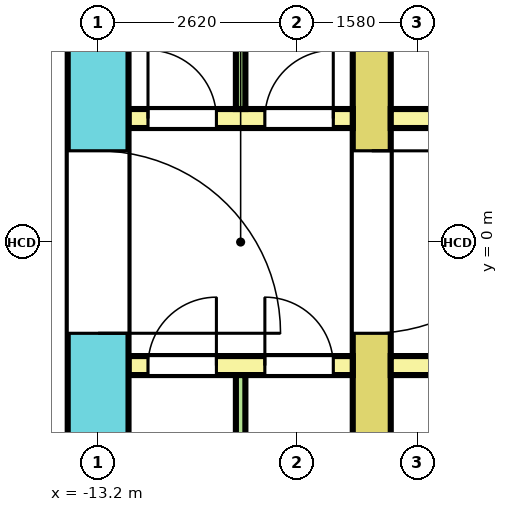
"""IFC4 building model, lengths in metres.
Left out: names, types, materials, properties, quantities, classifications, styles, units other than length and angle.
Written with IfcOpenShell. Run it as: python <this file> out.ifc"""

import sys

from ifc_helpers import new_model, si_unit, direction, frame, frame_2d, origin, place, context, subcontext, project, spatial, rectangle, extrude, element, fill, save


model = new_model("IFC4")
c1 = context("Model", 3, precision=1e-05, world=origin(), true_north=direction((0.0, 1.0)))
c2 = subcontext(c1, "Body", "Model", "MODEL_VIEW")
j1 = project(units=[si_unit("LENGTHUNIT", "METRE"), si_unit("PLANEANGLEUNIT", "RADIAN")], contexts=[c1])
p1 = place(None, origin())
s1 = spatial("IfcSite", under=j1, at=p1, CompositionType="ELEMENT")
p2 = place(p1, origin())
s2 = spatial("IfcBuilding", under=s1, at=p2, CompositionType="ELEMENT")
p3 = place(p2, frame((0.0, 0.0, 117.6)))
s3 = spatial("IfcBuildingStorey", under=s2, at=p3, CompositionType="ELEMENT", Elevation=117.6)
p4 = place(p3, frame((-13.2, -10.4, 0.0), z_axis=(0.0, 0.0, 1.0), x_axis=(0.0, 1.0, 0.0)))
e1 = element("IfcWall", 1, at=p4, inside=s3, PredefinedType="SHEAR", context=c2, shape_type="SweptSolid", body=[
    extrude(rectangle(XDim=20.8, YDim=0.8, at=frame_2d((10.4, 0.0))), origin(), (0.0, 0.0, 1.0), 4.1),
])
p5 = place(p4, frame((9.2, 0.0, 0.0)))
e2 = element("IfcOpeningElement", 2, at=p5, cuts=e1, PredefinedType="OPENING", context=c2, shape_type="SweptSolid", body=[
    extrude(rectangle(XDim=2.4, YDim=2.1, at=frame_2d((1.2, 1.05))), frame((0.0, 0.41, 0.0), z_axis=(0.0, -1.0, 0.0), x_axis=(1.0, 0.0, 0.0)), (0.0, 0.0, 1.0), 0.82),
])
p6 = place(p4, frame((16.1, 0.0, 0.0)))
e3 = element("IfcOpeningElement", 3, at=p6, cuts=e1, PredefinedType="OPENING", context=c2, shape_type="SweptSolid", body=[
    extrude(rectangle(XDim=1.2, YDim=2.1, at=frame_2d((0.6, 1.05))), frame((0.0, 0.41, 0.0), z_axis=(0.0, -1.0, 0.0), x_axis=(1.0, 0.0, 0.0)), (0.0, 0.0, 1.0), 0.82),
])
p7 = place(p4, frame((3.5, 0.0, 0.0)))
e4 = element("IfcOpeningElement", 4, at=p7, cuts=e1, PredefinedType="OPENING", context=c2, shape_type="SweptSolid", body=[
    extrude(rectangle(XDim=1.2, YDim=2.1, at=frame_2d((0.6, 1.05))), frame((0.0, 0.41, 0.0), z_axis=(0.0, -1.0, 0.0), x_axis=(1.0, 0.0, 0.0)), (0.0, 0.0, 1.0), 0.82),
])
p8 = place(p3, frame((-9.6, -7.7, 0.0), z_axis=(0.0, 0.0, 1.0), x_axis=(0.0, 1.0, 0.0)))
e5 = element("IfcWall", 5, at=p8, inside=s3, PredefinedType="SHEAR", context=c2, shape_type="SweptSolid", body=[
    extrude(rectangle(XDim=15.4, YDim=0.5, at=frame_2d((7.7, 0.0))), origin(), (0.0, 0.0, 1.0), 4.1),
])
p9 = place(p8, frame((6.5, 0.0, 0.0)))
e6 = element("IfcOpeningElement", 6, at=p9, cuts=e5, PredefinedType="OPENING", context=c2, shape_type="SweptSolid", body=[
    extrude(rectangle(XDim=2.4, YDim=2.1, at=frame_2d((1.2, 1.05))), frame((0.0, 0.26, 0.0), z_axis=(0.0, -1.0, 0.0), x_axis=(1.0, 0.0, 0.0)), (0.0, 0.0, 1.0), 0.52),
])
p10 = place(p8, frame((13.4, 0.0, 0.0)))
e7 = element("IfcOpeningElement", 7, at=p10, cuts=e5, PredefinedType="OPENING", context=c2, shape_type="SweptSolid", body=[
    extrude(rectangle(XDim=1.2, YDim=2.1, at=frame_2d((0.6, 1.05))), frame((0.0, 0.26, 0.0), z_axis=(0.0, -1.0, 0.0), x_axis=(1.0, 0.0, 0.0)), (0.0, 0.0, 1.0), 0.52),
])
p11 = place(p8, frame((0.8, 0.0, 0.0)))
e8 = element("IfcOpeningElement", 8, at=p11, cuts=e5, PredefinedType="OPENING", context=c2, shape_type="SweptSolid", body=[
    extrude(rectangle(XDim=1.2, YDim=2.1, at=frame_2d((0.6, 1.05))), frame((0.0, 0.26, 0.0), z_axis=(0.0, -1.0, 0.0), x_axis=(1.0, 0.0, 0.0)), (0.0, 0.0, 1.0), 0.52),
])
p12 = place(p3, frame((-12.8, 1.625, 0.0), z_axis=(0.0, 0.0, 1.0), x_axis=(1.0, 0.0, 0.0)))
e9 = element("IfcWall", 9, at=p12, inside=s3, PredefinedType="SOLIDWALL", context=c2, shape_type="SweptSolid", body=[
    extrude(rectangle(XDim=2.95, YDim=0.25, at=frame_2d((1.475, 0.0))), origin(), (0.0, 0.0, 1.0), 4.1),
])
p13 = place(p12, frame((0.256, 0.0, 0.0)))
e10 = element("IfcOpeningElement", 10, at=p13, cuts=e9, PredefinedType="OPENING", context=c2, shape_type="SweptSolid", body=[
    extrude(rectangle(XDim=0.9, YDim=2.1, at=frame_2d((0.45, 1.05))), frame((0.0, 0.135, 0.0), z_axis=(0.0, -1.0, 0.0), x_axis=(1.0, 0.0, 0.0)), (0.0, 0.0, 1.0), 0.27),
])
p14 = place(p12, frame((1.794, 0.0, 0.0)))
e11 = element("IfcOpeningElement", 11, at=p14, cuts=e9, PredefinedType="OPENING", context=c2, shape_type="SweptSolid", body=[
    extrude(rectangle(XDim=0.9, YDim=2.1, at=frame_2d((0.45, 1.05))), frame((0.0, 0.135, 0.0), z_axis=(0.0, -1.0, 0.0), x_axis=(1.0, 0.0, 0.0)), (0.0, 0.0, 1.0), 0.27),
])
p15 = place(p3, frame((-9.35, 1.625, 0.0), z_axis=(0.0, 0.0, 1.0), x_axis=(1.0, 0.0, 0.0)))
e12 = element("IfcWall", 12, at=p15, inside=s3, PredefinedType="SOLIDWALL", context=c2, shape_type="SweptSolid", body=[
    extrude(rectangle(XDim=18.7, YDim=0.25, at=frame_2d((9.35, 0.0))), origin(), (0.0, 0.0, 1.0), 4.1),
])
p16 = place(p15, frame((2.85, 0.0, 0.0)))
e13 = element("IfcOpeningElement", 13, at=p16, cuts=e12, PredefinedType="OPENING", context=c2, shape_type="SweptSolid", body=[
    extrude(rectangle(XDim=1.1, YDim=2.1, at=frame_2d((0.55, 1.05))), frame((0.0, 0.135, 0.0), z_axis=(0.0, -1.0, 0.0), x_axis=(1.0, 0.0, 0.0)), (0.0, 0.0, 1.0), 0.27),
])
p17 = place(p15, frame((5.15, 0.0, 0.0)))
e14 = element("IfcOpeningElement", 14, at=p17, cuts=e12, PredefinedType="OPENING", context=c2, shape_type="SweptSolid", body=[
    extrude(rectangle(XDim=1.1, YDim=2.1, at=frame_2d((0.55, 1.05))), frame((0.0, 0.135, 0.0), z_axis=(0.0, -1.0, 0.0), x_axis=(1.0, 0.0, 0.0)), (0.0, 0.0, 1.0), 0.27),
])
p18 = place(p15, frame((14.8, 0.0, 0.0)))
e15 = element("IfcOpeningElement", 15, at=p18, cuts=e12, PredefinedType="OPENING", context=c2, shape_type="SweptSolid", body=[
    extrude(rectangle(XDim=1.1, YDim=2.1, at=frame_2d((0.55, 1.05))), frame((0.0, 0.135, 0.0), z_axis=(0.0, -1.0, 0.0), x_axis=(1.0, 0.0, 0.0)), (0.0, 0.0, 1.0), 0.27),
])
p19 = place(p15, frame((0.575, 0.0, 0.0)))
e16 = element("IfcOpeningElement", 16, at=p19, cuts=e12, PredefinedType="OPENING", context=c2, shape_type="SweptSolid", body=[
    extrude(rectangle(XDim=0.9, YDim=2.1, at=frame_2d((0.45, 1.05))), frame((0.0, 0.135, 0.0), z_axis=(0.0, -1.0, 0.0), x_axis=(1.0, 0.0, 0.0)), (0.0, 0.0, 1.0), 0.27),
])
p20 = place(p15, frame((17.225, 0.0, 0.0)))
e17 = element("IfcOpeningElement", 17, at=p20, cuts=e12, PredefinedType="OPENING", context=c2, shape_type="SweptSolid", body=[
    extrude(rectangle(XDim=0.9, YDim=2.1, at=frame_2d((0.45, 1.05))), frame((0.0, 0.135, 0.0), z_axis=(0.0, -1.0, 0.0), x_axis=(1.0, 0.0, 0.0)), (0.0, 0.0, 1.0), 0.27),
])
p21 = place(p3, frame((-12.8, -1.625, 0.0), z_axis=(0.0, 0.0, 1.0), x_axis=(1.0, 0.0, 0.0)))
e18 = element("IfcWall", 18, at=p21, inside=s3, PredefinedType="SOLIDWALL", context=c2, shape_type="SweptSolid", body=[
    extrude(rectangle(XDim=2.95, YDim=0.25, at=frame_2d((1.475, 0.0))), origin(), (0.0, 0.0, 1.0), 4.1),
])
p22 = place(p21, frame((0.256, 0.0, 0.0)))
e19 = element("IfcOpeningElement", 19, at=p22, cuts=e18, PredefinedType="OPENING", context=c2, shape_type="SweptSolid", body=[
    extrude(rectangle(XDim=0.9, YDim=2.1, at=frame_2d((0.45, 1.05))), frame((0.0, 0.135, 0.0), z_axis=(0.0, -1.0, 0.0), x_axis=(1.0, 0.0, 0.0)), (0.0, 0.0, 1.0), 0.27),
])
p23 = place(p21, frame((1.794, 0.0, 0.0)))
e20 = element("IfcOpeningElement", 20, at=p23, cuts=e18, PredefinedType="OPENING", context=c2, shape_type="SweptSolid", body=[
    extrude(rectangle(XDim=0.9, YDim=2.1, at=frame_2d((0.45, 1.05))), frame((0.0, 0.135, 0.0), z_axis=(0.0, -1.0, 0.0), x_axis=(1.0, 0.0, 0.0)), (0.0, 0.0, 1.0), 0.27),
])
p24 = place(p3, frame((-9.35, -1.625, 0.0), z_axis=(0.0, 0.0, 1.0), x_axis=(1.0, 0.0, 0.0)))
e21 = element("IfcWall", 21, at=p24, inside=s3, PredefinedType="SOLIDWALL", context=c2, shape_type="SweptSolid", body=[
    extrude(rectangle(XDim=18.7, YDim=0.25, at=frame_2d((9.35, 0.0))), origin(), (0.0, 0.0, 1.0), 4.1),
])
p25 = place(p24, frame((2.85, 0.0, 0.0)))
e22 = element("IfcOpeningElement", 22, at=p25, cuts=e21, PredefinedType="OPENING", context=c2, shape_type="SweptSolid", body=[
    extrude(rectangle(XDim=1.1, YDim=2.1, at=frame_2d((0.55, 1.05))), frame((0.0, 0.135, 0.0), z_axis=(0.0, -1.0, 0.0), x_axis=(1.0, 0.0, 0.0)), (0.0, 0.0, 1.0), 0.27),
])
p26 = place(p24, frame((5.15, 0.0, 0.0)))
e23 = element("IfcOpeningElement", 23, at=p26, cuts=e21, PredefinedType="OPENING", context=c2, shape_type="SweptSolid", body=[
    extrude(rectangle(XDim=1.1, YDim=2.1, at=frame_2d((0.55, 1.05))), frame((0.0, 0.135, 0.0), z_axis=(0.0, -1.0, 0.0), x_axis=(1.0, 0.0, 0.0)), (0.0, 0.0, 1.0), 0.27),
])
p27 = place(p24, frame((14.8, 0.0, 0.0)))
e24 = element("IfcOpeningElement", 24, at=p27, cuts=e21, PredefinedType="OPENING", context=c2, shape_type="SweptSolid", body=[
    extrude(rectangle(XDim=1.1, YDim=2.1, at=frame_2d((0.55, 1.05))), frame((0.0, 0.135, 0.0), z_axis=(0.0, -1.0, 0.0), x_axis=(1.0, 0.0, 0.0)), (0.0, 0.0, 1.0), 0.27),
])
p28 = place(p24, frame((0.575, 0.0, 0.0)))
e25 = element("IfcOpeningElement", 25, at=p28, cuts=e21, PredefinedType="OPENING", context=c2, shape_type="SweptSolid", body=[
    extrude(rectangle(XDim=0.9, YDim=2.1, at=frame_2d((0.45, 1.05))), frame((0.0, 0.135, 0.0), z_axis=(0.0, -1.0, 0.0), x_axis=(1.0, 0.0, 0.0)), (0.0, 0.0, 1.0), 0.27),
])
p29 = place(p24, frame((17.225, 0.0, 0.0)))
e26 = element("IfcOpeningElement", 26, at=p29, cuts=e21, PredefinedType="OPENING", context=c2, shape_type="SweptSolid", body=[
    extrude(rectangle(XDim=0.9, YDim=2.1, at=frame_2d((0.45, 1.05))), frame((0.0, 0.135, 0.0), z_axis=(0.0, -1.0, 0.0), x_axis=(1.0, 0.0, 0.0)), (0.0, 0.0, 1.0), 0.27),
])
for number, where, z_axis, x_axis in (
    (27, (-11.325, 1.75, 0.0), (0.0, 0.0, 1.0), (0.0, 1.0, 0.0)),
    (28, (-11.325, -4.65, 0.0), (0.0, 0.0, 1.0), (0.0, 1.0, 0.0)),
):
    element("IfcWall", number, at=place(p3, frame(where, z_axis=z_axis, x_axis=x_axis)), inside=s3, PredefinedType="PARTITIONING", context=c2, shape_type="SweptSolid", body=[
        extrude(rectangle(XDim=2.9, YDim=0.125, at=frame_2d((1.45, 0.0))), origin(), (0.0, 0.0, 1.0), 4.1),
    ])
p30 = place(p9, origin())
e29 = element("IfcDoor", 29, at=p30, inside=s3, OperationType="DOUBLE_DOOR_SINGLE_SWING", PredefinedType="DOOR", context=c2, shape_type="SweptSolid", body=[
    extrude(rectangle(XDim=2.4, YDim=2.1, at=frame_2d((1.2, 1.05))), frame((0.0, 0.2, 0.0), z_axis=(0.0, -1.0, 0.0), x_axis=(1.0, 0.0, 0.0)), (0.0, 0.0, 1.0), 0.4),
])
fill(e6, e29)
p31 = place(p5, origin())
e30 = element("IfcDoor", 30, at=p31, inside=s3, OperationType="DOUBLE_DOOR_SINGLE_SWING", PredefinedType="DOOR", context=c2, shape_type="SweptSolid", body=[
    extrude(rectangle(XDim=2.4, YDim=2.1, at=frame_2d((1.2, 1.05))), frame((0.0, 0.3, 0.0), z_axis=(0.0, -1.0, 0.0), x_axis=(1.0, 0.0, 0.0)), (0.0, 0.0, 1.0), 0.6),
])
fill(e2, e30)
p32 = place(p13, origin())
e31 = element("IfcDoor", 31, at=p32, inside=s3, OperationType="SINGLE_SWING_RIGHT", PredefinedType="DOOR", context=c2, shape_type="SweptSolid", body=[
    extrude(rectangle(XDim=0.9, YDim=2.1, at=frame_2d((0.45, 1.05))), frame((0.0, 0.075, 0.0), z_axis=(0.0, -1.0, 0.0), x_axis=(1.0, 0.0, 0.0)), (0.0, 0.0, 1.0), 0.15),
])
fill(e10, e31)
p33 = place(p14, origin())
e32 = element("IfcDoor", 32, at=p33, inside=s3, OperationType="SINGLE_SWING_LEFT", PredefinedType="DOOR", context=c2, shape_type="SweptSolid", body=[
    extrude(rectangle(XDim=0.9, YDim=2.1, at=frame_2d((0.45, 1.05))), frame((0.0, 0.075, 0.0), z_axis=(0.0, -1.0, 0.0), x_axis=(1.0, 0.0, 0.0)), (0.0, 0.0, 1.0), 0.15),
])
fill(e11, e32)
p34 = place(p22, origin())
e33 = element("IfcDoor", 33, at=p34, inside=s3, OperationType="SINGLE_SWING_RIGHT", PredefinedType="DOOR", context=c2, shape_type="SweptSolid", body=[
    extrude(rectangle(XDim=0.9, YDim=2.1, at=frame_2d((0.45, 1.05))), frame((0.0, 0.075, 0.0), z_axis=(0.0, -1.0, 0.0), x_axis=(1.0, 0.0, 0.0)), (0.0, 0.0, 1.0), 0.15),
])
fill(e19, e33)
p35 = place(p23, origin())
e34 = element("IfcDoor", 34, at=p35, inside=s3, OperationType="SINGLE_SWING_LEFT", PredefinedType="DOOR", context=c2, shape_type="SweptSolid", body=[
    extrude(rectangle(XDim=0.9, YDim=2.1, at=frame_2d((0.45, 1.05))), frame((0.0, 0.075, 0.0), z_axis=(0.0, -1.0, 0.0), x_axis=(1.0, 0.0, 0.0)), (0.0, 0.0, 1.0), 0.15),
])
fill(e20, e34)
save(model, sys.argv[1])
